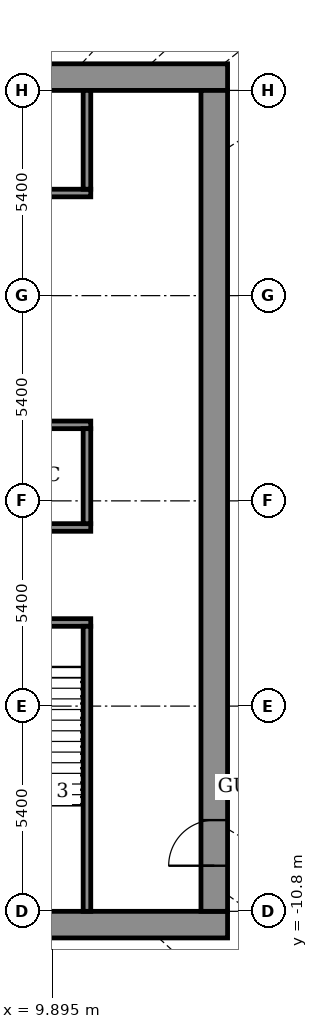
"""IFC4 building model, lengths in metres.
Left out: names, types, materials, properties, quantities, classifications, styles, units other than length and angle.
Written with IfcOpenShell. Run it as: python <this file> out.ifc"""

import sys

from ifc_helpers import new_model, si_unit, direction, frame, frame_2d, origin, place, context, subcontext, project, spatial, rectangle, extrude, element, fill, save


model = new_model("IFC4")
c1 = context("Model", 3, precision=1e-05, world=origin(), true_north=direction((0.0, 1.0)))
c2 = subcontext(c1, "Body", "Model", "MODEL_VIEW")
j1 = project(units=[si_unit("LENGTHUNIT", "METRE"), si_unit("PLANEANGLEUNIT", "RADIAN")], contexts=[c1])
p1 = place(None, origin())
s1 = spatial("IfcSite", under=j1, at=p1, CompositionType="ELEMENT")
p2 = place(p1, origin())
s2 = spatial("IfcBuilding", under=s1, at=p2, CompositionType="ELEMENT")
p3 = place(p2, frame((0.0, 0.0, 275.3)))
s3 = spatial("IfcBuildingStorey", under=s2, at=p3, CompositionType="ELEMENT", Elevation=275.3)
for number, where, z_axis, x_axis in (
    (1, (-14.5, -11.15, 0.0), (0.0, 0.0, 1.0), (1.0, 0.0, 0.0)),
    (2, (-14.5, 11.15, 0.0), (0.0, 0.0, 1.0), (1.0, 0.0, 0.0)),
):
    element("IfcWall", number, at=place(p3, frame(where, z_axis=z_axis, x_axis=x_axis)), inside=s3, PredefinedType="SHEAR", context=c2, shape_type="SweptSolid", body=[
        extrude(rectangle(XDim=29.0, YDim=0.7, at=frame_2d((14.5, 0.0))), origin(), (0.0, 0.0, 1.0), 4.6),
    ])
p4 = place(p3, frame((14.15, -10.8, 0.0), z_axis=(0.0, 0.0, 1.0), x_axis=(0.0, 1.0, 0.0)))
e3 = element("IfcWall", 3, at=p4, inside=s3, PredefinedType="SHEAR", context=c2, shape_type="SweptSolid", body=[
    extrude(rectangle(XDim=21.6, YDim=0.7, at=frame_2d((10.8, 0.0))), origin(), (0.0, 0.0, 1.0), 4.6),
])
p5 = place(p4, frame((1.2, 0.0, 0.0)))
e4 = element("IfcOpeningElement", 4, at=p5, cuts=e3, PredefinedType="OPENING", context=c2, shape_type="SweptSolid", body=[
    extrude(rectangle(XDim=1.2, YDim=2.1, at=frame_2d((0.6, 1.05))), frame((0.0, 0.36, 0.0), z_axis=(0.0, -1.0, 0.0), x_axis=(1.0, 0.0, 0.0)), (0.0, 0.0, 1.0), 0.72),
])
p6 = place(p3, frame((-10.9, -3.2, 0.0), z_axis=(0.0, 0.0, 1.0), x_axis=(1.0, 0.0, 0.0)))
e5 = element("IfcWall", 5, at=p6, inside=s3, PredefinedType="SHEAR", context=c2, shape_type="SweptSolid", body=[
    extrude(rectangle(XDim=21.8, YDim=0.2, at=frame_2d((10.9, 0.0))), origin(), (0.0, 0.0, 1.0), 4.05),
])
p7 = place(p6, frame((1.075, 0.0, 0.0)))
e6 = element("IfcOpeningElement", 6, at=p7, cuts=e5, PredefinedType="OPENING", context=c2, shape_type="SweptSolid", body=[
    extrude(rectangle(XDim=1.1, YDim=2.1, at=frame_2d((0.55, 1.05))), frame((0.0, 0.11, 0.0), z_axis=(0.0, -1.0, 0.0), x_axis=(1.0, 0.0, 0.0)), (0.0, 0.0, 1.0), 0.22),
])
p8 = place(p6, frame((10.325, 0.0, 0.0)))
e7 = element("IfcOpeningElement", 7, at=p8, cuts=e5, PredefinedType="OPENING", context=c2, shape_type="SweptSolid", body=[
    extrude(rectangle(XDim=1.1, YDim=2.1, at=frame_2d((0.55, 1.05))), frame((0.0, 0.11, 0.0), z_axis=(0.0, -1.0, 0.0), x_axis=(1.0, 0.0, 0.0)), (0.0, 0.0, 1.0), 0.22),
])
p9 = place(p6, frame((19.625, 0.0, 0.0)))
e8 = element("IfcOpeningElement", 8, at=p9, cuts=e5, PredefinedType="OPENING", context=c2, shape_type="SweptSolid", body=[
    extrude(rectangle(XDim=1.1, YDim=2.1, at=frame_2d((0.55, 1.05))), frame((0.0, 0.11, 0.0), z_axis=(0.0, -1.0, 0.0), x_axis=(1.0, 0.0, 0.0)), (0.0, 0.0, 1.0), 0.22),
])
p10 = place(p6, frame((5.7, 0.0, 0.0)))
e9 = element("IfcOpeningElement", 9, at=p10, cuts=e5, PredefinedType="OPENING", context=c2, shape_type="SweptSolid", body=[
    extrude(rectangle(XDim=1.1, YDim=2.1, at=frame_2d((0.55, 1.05))), frame((0.0, 0.11, 0.0), z_axis=(0.0, -1.0, 0.0), x_axis=(1.0, 0.0, 0.0)), (0.0, 0.0, 1.0), 0.22),
])
p11 = place(p6, frame((14.975, 0.0, 0.0)))
e10 = element("IfcOpeningElement", 10, at=p11, cuts=e5, PredefinedType="OPENING", context=c2, shape_type="SweptSolid", body=[
    extrude(rectangle(XDim=1.1, YDim=2.1, at=frame_2d((0.55, 1.05))), frame((0.0, 0.11, 0.0), z_axis=(0.0, -1.0, 0.0), x_axis=(1.0, 0.0, 0.0)), (0.0, 0.0, 1.0), 0.22),
])
p12 = place(p3, frame((-10.9, -0.7, 0.0), z_axis=(0.0, 0.0, 1.0), x_axis=(1.0, 0.0, 0.0)))
e11 = element("IfcWall", 11, at=p12, inside=s3, PredefinedType="SHEAR", context=c2, shape_type="SweptSolid", body=[
    extrude(rectangle(XDim=21.8, YDim=0.2, at=frame_2d((10.9, 0.0))), origin(), (0.0, 0.0, 1.0), 4.05),
])
p13 = place(p3, frame((-10.9, 2.0, 0.0), z_axis=(0.0, 0.0, 1.0), x_axis=(1.0, 0.0, 0.0)))
e12 = element("IfcWall", 12, at=p13, inside=s3, PredefinedType="SHEAR", context=c2, shape_type="SweptSolid", body=[
    extrude(rectangle(XDim=21.8, YDim=0.2, at=frame_2d((10.9, 0.0))), origin(), (0.0, 0.0, 1.0), 4.05),
])
p14 = place(p13, frame((4.95, 0.0, 0.0)))
e13 = element("IfcOpeningElement", 13, at=p14, cuts=e12, PredefinedType="OPENING", context=c2, shape_type="SweptSolid", body=[
    extrude(rectangle(XDim=1.1, YDim=2.1, at=frame_2d((0.55, 1.05))), frame((0.0, 0.11, 0.0), z_axis=(0.0, -1.0, 0.0), x_axis=(1.0, 0.0, 0.0)), (0.0, 0.0, 1.0), 0.22),
])
p15 = place(p13, frame((7.65, 0.0, 0.0)))
e14 = element("IfcOpeningElement", 14, at=p15, cuts=e12, PredefinedType="OPENING", context=c2, shape_type="SweptSolid", body=[
    extrude(rectangle(XDim=1.1, YDim=2.1, at=frame_2d((0.55, 1.05))), frame((0.0, 0.11, 0.0), z_axis=(0.0, -1.0, 0.0), x_axis=(1.0, 0.0, 0.0)), (0.0, 0.0, 1.0), 0.22),
])
p16 = place(p13, frame((10.35, 0.0, 0.0)))
e15 = element("IfcOpeningElement", 15, at=p16, cuts=e12, PredefinedType="OPENING", context=c2, shape_type="SweptSolid", body=[
    extrude(rectangle(XDim=1.1, YDim=2.1, at=frame_2d((0.55, 1.05))), frame((0.0, 0.11, 0.0), z_axis=(0.0, -1.0, 0.0), x_axis=(1.0, 0.0, 0.0)), (0.0, 0.0, 1.0), 0.22),
])
p17 = place(p13, frame((1.675, 0.0, 0.0)))
e16 = element("IfcOpeningElement", 16, at=p17, cuts=e12, PredefinedType="OPENING", context=c2, shape_type="SweptSolid", body=[
    extrude(rectangle(XDim=0.9, YDim=2.1, at=frame_2d((0.45, 1.05))), frame((0.0, 0.11, 0.0), z_axis=(0.0, -1.0, 0.0), x_axis=(1.0, 0.0, 0.0)), (0.0, 0.0, 1.0), 0.22),
])
p18 = place(p13, frame((14.5, 0.0, 0.0)))
e17 = element("IfcOpeningElement", 17, at=p18, cuts=e12, PredefinedType="OPENING", context=c2, shape_type="SweptSolid", body=[
    extrude(rectangle(XDim=0.9, YDim=2.1, at=frame_2d((0.45, 1.05))), frame((0.0, 0.11, 0.0), z_axis=(0.0, -1.0, 0.0), x_axis=(1.0, 0.0, 0.0)), (0.0, 0.0, 1.0), 0.22),
])
p19 = place(p13, frame((19.225, 0.0, 0.0)))
e18 = element("IfcOpeningElement", 18, at=p19, cuts=e12, PredefinedType="OPENING", context=c2, shape_type="SweptSolid", body=[
    extrude(rectangle(XDim=0.9, YDim=2.1, at=frame_2d((0.45, 1.05))), frame((0.0, 0.11, 0.0), z_axis=(0.0, -1.0, 0.0), x_axis=(1.0, 0.0, 0.0)), (0.0, 0.0, 1.0), 0.22),
])
p20 = place(p3, frame((-10.9, 8.1, 0.0), z_axis=(0.0, 0.0, 1.0), x_axis=(1.0, 0.0, 0.0)))
e19 = element("IfcWall", 19, at=p20, inside=s3, PredefinedType="SHEAR", context=c2, shape_type="SweptSolid", body=[
    extrude(rectangle(XDim=21.8, YDim=0.2, at=frame_2d((10.9, 0.0))), origin(), (0.0, 0.0, 1.0), 4.05),
])
p21 = place(p20, frame((4.95, 0.0, 0.0)))
e20 = element("IfcOpeningElement", 20, at=p21, cuts=e19, PredefinedType="OPENING", context=c2, shape_type="SweptSolid", body=[
    extrude(rectangle(XDim=1.1, YDim=2.1, at=frame_2d((0.55, 1.05))), frame((0.0, 0.11, 0.0), z_axis=(0.0, -1.0, 0.0), x_axis=(1.0, 0.0, 0.0)), (0.0, 0.0, 1.0), 0.22),
])
p22 = place(p20, frame((7.65, 0.0, 0.0)))
e21 = element("IfcOpeningElement", 21, at=p22, cuts=e19, PredefinedType="OPENING", context=c2, shape_type="SweptSolid", body=[
    extrude(rectangle(XDim=1.1, YDim=2.1, at=frame_2d((0.55, 1.05))), frame((0.0, 0.11, 0.0), z_axis=(0.0, -1.0, 0.0), x_axis=(1.0, 0.0, 0.0)), (0.0, 0.0, 1.0), 0.22),
])
p23 = place(p20, frame((10.35, 0.0, 0.0)))
e22 = element("IfcOpeningElement", 22, at=p23, cuts=e19, PredefinedType="OPENING", context=c2, shape_type="SweptSolid", body=[
    extrude(rectangle(XDim=1.1, YDim=2.1, at=frame_2d((0.55, 1.05))), frame((0.0, 0.11, 0.0), z_axis=(0.0, -1.0, 0.0), x_axis=(1.0, 0.0, 0.0)), (0.0, 0.0, 1.0), 0.22),
])
p24 = place(p20, frame((1.675, 0.0, 0.0)))
e23 = element("IfcOpeningElement", 23, at=p24, cuts=e19, PredefinedType="OPENING", context=c2, shape_type="SweptSolid", body=[
    extrude(rectangle(XDim=0.9, YDim=2.1, at=frame_2d((0.45, 1.05))), frame((0.0, 0.11, 0.0), z_axis=(0.0, -1.0, 0.0), x_axis=(1.0, 0.0, 0.0)), (0.0, 0.0, 1.0), 0.22),
])
p25 = place(p20, frame((14.5, 0.0, 0.0)))
e24 = element("IfcOpeningElement", 24, at=p25, cuts=e19, PredefinedType="OPENING", context=c2, shape_type="SweptSolid", body=[
    extrude(rectangle(XDim=0.9, YDim=2.1, at=frame_2d((0.45, 1.05))), frame((0.0, 0.11, 0.0), z_axis=(0.0, -1.0, 0.0), x_axis=(1.0, 0.0, 0.0)), (0.0, 0.0, 1.0), 0.22),
])
p26 = place(p20, frame((19.225, 0.0, 0.0)))
e25 = element("IfcOpeningElement", 25, at=p26, cuts=e19, PredefinedType="OPENING", context=c2, shape_type="SweptSolid", body=[
    extrude(rectangle(XDim=0.9, YDim=2.1, at=frame_2d((0.45, 1.05))), frame((0.0, 0.11, 0.0), z_axis=(0.0, -1.0, 0.0), x_axis=(1.0, 0.0, 0.0)), (0.0, 0.0, 1.0), 0.22),
])
p27 = place(p3, frame((10.8, -10.8, 0.0), z_axis=(0.0, 0.0, 1.0), x_axis=(0.0, 1.0, 0.0)))
e26 = element("IfcWall", 26, at=p27, inside=s3, PredefinedType="SHEAR", context=c2, shape_type="SweptSolid", body=[
    extrude(rectangle(XDim=7.5, YDim=0.2, at=frame_2d((3.75, 0.0))), origin(), (0.0, 0.0, 1.0), 4.05),
])
p28 = place(p3, frame((10.8, -0.6, 0.0), z_axis=(0.0, 0.0, 1.0), x_axis=(0.0, 1.0, 0.0)))
e27 = element("IfcWall", 27, at=p28, inside=s3, PredefinedType="STANDARD", context=c2, shape_type="SweptSolid", body=[
    extrude(rectangle(XDim=2.5, YDim=0.2, at=frame_2d((1.25, 0.0))), origin(), (0.0, 0.0, 1.0), 4.05),
])
p29 = place(p3, frame((10.8, 8.2, 0.0), z_axis=(0.0, 0.0, 1.0), x_axis=(0.0, 1.0, 0.0)))
e28 = element("IfcWall", 28, at=p29, inside=s3, PredefinedType="STANDARD", context=c2, shape_type="SweptSolid", body=[
    extrude(rectangle(XDim=2.6, YDim=0.2, at=frame_2d((1.3, 0.0))), origin(), (0.0, 0.0, 1.0), 4.05),
])
p30 = place(p5, origin())
e29 = element("IfcDoor", 29, at=p30, inside=s3, OperationType="DOUBLE_DOOR_SINGLE_SWING", PredefinedType="DOOR", context=c2, shape_type="SweptSolid", body=[
    extrude(rectangle(XDim=1.2, YDim=2.1, at=frame_2d((0.6, 1.05))), frame((0.0, 0.025, 0.0), z_axis=(0.0, -1.0, 0.0), x_axis=(1.0, 0.0, 0.0)), (0.0, 0.0, 1.0), 0.05),
])
fill(e4, e29)
save(model, sys.argv[1])
